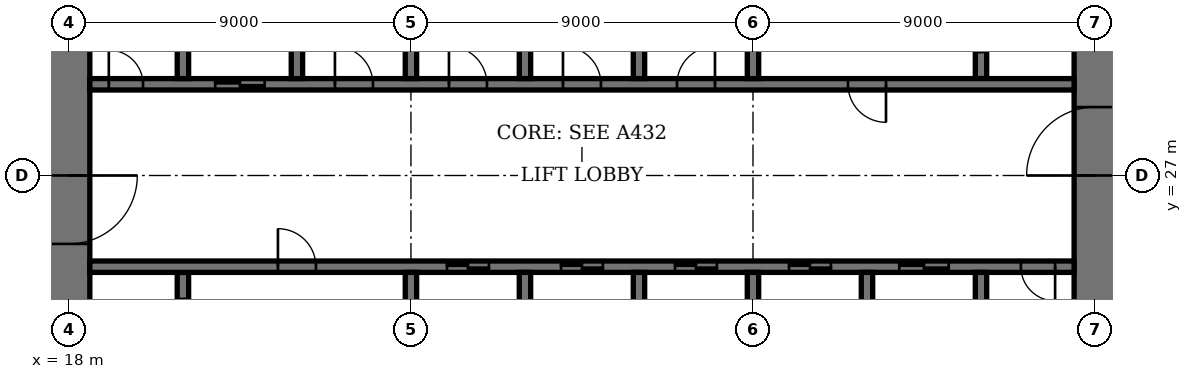
"""IFC4 building model, lengths in metres.
Left out: names, types, materials, properties, quantities, classifications, styles, units other than length and angle.
Written with IfcOpenShell. Run it as: python <this file> out.ifc"""

import sys

from ifc_helpers import new_model, si_unit, direction, frame, frame_2d, origin, place, context, subcontext, project, spatial, rectangle, extrude, element, fill, save


model = new_model("IFC4")
c1 = context("Model", 3, precision=1e-05, world=origin(), true_north=direction((0.0, 1.0)))
c2 = subcontext(c1, "Body", "Model", "MODEL_VIEW")
j1 = project(units=[si_unit("LENGTHUNIT", "METRE"), si_unit("PLANEANGLEUNIT", "RADIAN")], contexts=[c1])
p1 = place(None, origin())
s1 = spatial("IfcSite", under=j1, at=p1, CompositionType="ELEMENT")
p2 = place(p1, origin())
s2 = spatial("IfcBuilding", under=s1, at=p2, CompositionType="ELEMENT")
p3 = place(p2, frame((0.0, 0.0, 259.4)))
s3 = spatial("IfcBuildingStorey", under=s2, at=p3, CompositionType="ELEMENT", Elevation=259.4)
p4 = place(p3, frame((18.0, 35.45, 0.0), z_axis=(0.0, 0.0, 1.0), x_axis=(0.0, -1.0, 0.0)))
e1 = element("IfcWall", 1, at=p4, inside=s3, PredefinedType="SHEAR", context=c2, shape_type="SweptSolid", body=[
    extrude(rectangle(XDim=16.9, YDim=1.1, at=frame_2d((8.45, 0.0))), origin(), (0.0, 0.0, 1.0), 4.0),
])
p5 = place(p4, frame((8.45, 0.0, 0.0)))
e2 = element("IfcOpeningElement", 2, at=p5, cuts=e1, PredefinedType="OPENING", context=c2, shape_type="SweptSolid", body=[
    extrude(rectangle(XDim=1.8, YDim=2.4, at=frame_2d((0.9, 1.2))), frame((0.0, 0.56, 0.0), z_axis=(0.0, -1.0, 0.0), x_axis=(1.0, 0.0, 0.0)), (0.0, 0.0, 1.0), 1.12),
])
p6 = place(p3, frame((45.0, 18.55, 0.0), z_axis=(0.0, 0.0, 1.0), x_axis=(0.0, 1.0, 0.0)))
e3 = element("IfcWall", 3, at=p6, inside=s3, PredefinedType="SHEAR", context=c2, shape_type="SweptSolid", body=[
    extrude(rectangle(XDim=16.9, YDim=1.1, at=frame_2d((8.45, 0.0))), origin(), (0.0, 0.0, 1.0), 4.0),
])
p7 = place(p6, frame((8.45, 0.0, 0.0)))
e4 = element("IfcOpeningElement", 4, at=p7, cuts=e3, PredefinedType="OPENING", context=c2, shape_type="SweptSolid", body=[
    extrude(rectangle(XDim=1.8, YDim=2.4, at=frame_2d((0.9, 1.2))), frame((0.0, 0.56, 0.0), z_axis=(0.0, -1.0, 0.0), x_axis=(1.0, 0.0, 0.0)), (0.0, 0.0, 1.0), 1.12),
])
p8 = place(p3, frame((21.0, 21.95, 0.0), z_axis=(0.0, 0.0, 1.0), x_axis=(0.0, 1.0, 0.0)))
e5 = element("IfcWall", 5, at=p8, inside=s3, PredefinedType="SHEAR", context=c2, shape_type="SweptSolid", body=[
    extrude(rectangle(XDim=2.5, YDim=0.3, at=frame_2d((1.25, 0.0))), origin(), (0.0, 0.0, 1.0), 4.0),
])
p9 = place(p8, frame((0.7, 0.0, 0.0)))
e6 = element("IfcOpeningElement", 6, at=p9, cuts=e5, PredefinedType="OPENING", context=c2, shape_type="SweptSolid", body=[
    extrude(rectangle(XDim=1.1, YDim=2.4, at=frame_2d((0.55, 1.2))), frame((0.0, 0.16, 0.0), z_axis=(0.0, -1.0, 0.0), x_axis=(1.0, 0.0, 0.0)), (0.0, 0.0, 1.0), 0.32),
])
p10 = place(p3, frame((42.0, 29.55, 0.0), z_axis=(0.0, 0.0, 1.0), x_axis=(0.0, 1.0, 0.0)))
e7 = element("IfcWall", 7, at=p10, inside=s3, PredefinedType="SHEAR", context=c2, shape_type="SweptSolid", body=[
    extrude(rectangle(XDim=2.5, YDim=0.3, at=frame_2d((1.25, 0.0))), origin(), (0.0, 0.0, 1.0), 4.0),
])
p11 = place(p10, frame((0.7, 0.0, 0.0)))
e8 = element("IfcOpeningElement", 8, at=p11, cuts=e7, PredefinedType="OPENING", context=c2, shape_type="SweptSolid", body=[
    extrude(rectangle(XDim=1.1, YDim=2.4, at=frame_2d((0.55, 1.2))), frame((0.0, 0.16, 0.0), z_axis=(0.0, -1.0, 0.0), x_axis=(1.0, 0.0, 0.0)), (0.0, 0.0, 1.0), 0.32),
])
p12 = place(p3, frame((18.55, 24.6, 0.0), z_axis=(0.0, 0.0, 1.0), x_axis=(1.0, 0.0, 0.0)))
e9 = element("IfcWall", 9, at=p12, inside=s3, PredefinedType="SHEAR", context=c2, shape_type="SweptSolid", body=[
    extrude(rectangle(XDim=25.9, YDim=0.3, at=frame_2d((12.95, 0.0))), origin(), (0.0, 0.0, 1.0), 4.0),
])
p13 = place(p12, frame((4.95, 0.0, 0.0)))
e10 = element("IfcOpeningElement", 10, at=p13, cuts=e9, PredefinedType="OPENING", context=c2, shape_type="SweptSolid", body=[
    extrude(rectangle(XDim=1.0, YDim=2.4, at=frame_2d((0.5, 1.2))), frame((0.0, 0.16, 0.0), z_axis=(0.0, -1.0, 0.0), x_axis=(1.0, 0.0, 0.0)), (0.0, 0.0, 1.0), 0.32),
])
p14 = place(p12, frame((24.5, 0.0, 0.0)))
e11 = element("IfcOpeningElement", 11, at=p14, cuts=e9, PredefinedType="OPENING", context=c2, shape_type="SweptSolid", body=[
    extrude(rectangle(XDim=0.9, YDim=2.1, at=frame_2d((0.45, 1.05))), frame((0.0, 0.16, 0.0), z_axis=(0.0, -1.0, 0.0), x_axis=(1.0, 0.0, 0.0)), (0.0, 0.0, 1.0), 0.32),
])
p15 = place(p12, frame((9.4, 0.0, 0.0)))
e12 = element("IfcOpeningElement", 12, at=p15, cuts=e9, PredefinedType="OPENING", context=c2, shape_type="SweptSolid", body=[
    extrude(rectangle(XDim=1.1, YDim=2.4, at=frame_2d((0.55, 1.2))), frame((0.0, 0.16, 0.0), z_axis=(0.0, -1.0, 0.0), x_axis=(1.0, 0.0, 0.0)), (0.0, 0.0, 1.0), 0.32),
])
p16 = place(p12, frame((12.4, 0.0, 0.0)))
e13 = element("IfcOpeningElement", 13, at=p16, cuts=e9, PredefinedType="OPENING", context=c2, shape_type="SweptSolid", body=[
    extrude(rectangle(XDim=1.1, YDim=2.4, at=frame_2d((0.55, 1.2))), frame((0.0, 0.16, 0.0), z_axis=(0.0, -1.0, 0.0), x_axis=(1.0, 0.0, 0.0)), (0.0, 0.0, 1.0), 0.32),
])
p17 = place(p12, frame((15.4, 0.0, 0.0)))
e14 = element("IfcOpeningElement", 14, at=p17, cuts=e9, PredefinedType="OPENING", context=c2, shape_type="SweptSolid", body=[
    extrude(rectangle(XDim=1.1, YDim=2.4, at=frame_2d((0.55, 1.2))), frame((0.0, 0.16, 0.0), z_axis=(0.0, -1.0, 0.0), x_axis=(1.0, 0.0, 0.0)), (0.0, 0.0, 1.0), 0.32),
])
p18 = place(p12, frame((18.4, 0.0, 0.0)))
e15 = element("IfcOpeningElement", 15, at=p18, cuts=e9, PredefinedType="OPENING", context=c2, shape_type="SweptSolid", body=[
    extrude(rectangle(XDim=1.1, YDim=2.4, at=frame_2d((0.55, 1.2))), frame((0.0, 0.16, 0.0), z_axis=(0.0, -1.0, 0.0), x_axis=(1.0, 0.0, 0.0)), (0.0, 0.0, 1.0), 0.32),
])
p19 = place(p12, frame((21.3, 0.0, 0.0)))
e16 = element("IfcOpeningElement", 16, at=p19, cuts=e9, PredefinedType="OPENING", context=c2, shape_type="SweptSolid", body=[
    extrude(rectangle(XDim=1.3, YDim=2.4, at=frame_2d((0.65, 1.2))), frame((0.0, 0.16, 0.0), z_axis=(0.0, -1.0, 0.0), x_axis=(1.0, 0.0, 0.0)), (0.0, 0.0, 1.0), 0.32),
])
p20 = place(p3, frame((18.55, 29.4, 0.0), z_axis=(0.0, 0.0, 1.0), x_axis=(1.0, 0.0, 0.0)))
e17 = element("IfcWall", 17, at=p20, inside=s3, PredefinedType="SHEAR", context=c2, shape_type="SweptSolid", body=[
    extrude(rectangle(XDim=25.9, YDim=0.3, at=frame_2d((12.95, 0.0))), origin(), (0.0, 0.0, 1.0), 4.0),
])
p21 = place(p20, frame((19.95, 0.0, 0.0)))
e18 = element("IfcOpeningElement", 18, at=p21, cuts=e17, PredefinedType="OPENING", context=c2, shape_type="SweptSolid", body=[
    extrude(rectangle(XDim=1.0, YDim=2.4, at=frame_2d((0.5, 1.2))), frame((0.0, 0.16, 0.0), z_axis=(0.0, -1.0, 0.0), x_axis=(1.0, 0.0, 0.0)), (0.0, 0.0, 1.0), 0.32),
])
p22 = place(p20, frame((0.5, 0.0, 0.0)))
e19 = element("IfcOpeningElement", 19, at=p22, cuts=e17, PredefinedType="OPENING", context=c2, shape_type="SweptSolid", body=[
    extrude(rectangle(XDim=0.9, YDim=2.1, at=frame_2d((0.45, 1.05))), frame((0.0, 0.16, 0.0), z_axis=(0.0, -1.0, 0.0), x_axis=(1.0, 0.0, 0.0)), (0.0, 0.0, 1.0), 0.32),
])
p23 = place(p20, frame((15.45, 0.0, 0.0)))
e20 = element("IfcOpeningElement", 20, at=p23, cuts=e17, PredefinedType="OPENING", context=c2, shape_type="SweptSolid", body=[
    extrude(rectangle(XDim=1.0, YDim=2.4, at=frame_2d((0.5, 1.2))), frame((0.0, 0.16, 0.0), z_axis=(0.0, -1.0, 0.0), x_axis=(1.0, 0.0, 0.0)), (0.0, 0.0, 1.0), 0.32),
])
p24 = place(p20, frame((12.45, 0.0, 0.0)))
e21 = element("IfcOpeningElement", 21, at=p24, cuts=e17, PredefinedType="OPENING", context=c2, shape_type="SweptSolid", body=[
    extrude(rectangle(XDim=1.0, YDim=2.4, at=frame_2d((0.5, 1.2))), frame((0.0, 0.16, 0.0), z_axis=(0.0, -1.0, 0.0), x_axis=(1.0, 0.0, 0.0)), (0.0, 0.0, 1.0), 0.32),
])
p25 = place(p20, frame((9.45, 0.0, 0.0)))
e22 = element("IfcOpeningElement", 22, at=p25, cuts=e17, PredefinedType="OPENING", context=c2, shape_type="SweptSolid", body=[
    extrude(rectangle(XDim=1.0, YDim=2.4, at=frame_2d((0.5, 1.2))), frame((0.0, 0.16, 0.0), z_axis=(0.0, -1.0, 0.0), x_axis=(1.0, 0.0, 0.0)), (0.0, 0.0, 1.0), 0.32),
])
p26 = place(p20, frame((6.45, 0.0, 0.0)))
e23 = element("IfcOpeningElement", 23, at=p26, cuts=e17, PredefinedType="OPENING", context=c2, shape_type="SweptSolid", body=[
    extrude(rectangle(XDim=1.0, YDim=2.4, at=frame_2d((0.5, 1.2))), frame((0.0, 0.16, 0.0), z_axis=(0.0, -1.0, 0.0), x_axis=(1.0, 0.0, 0.0)), (0.0, 0.0, 1.0), 0.32),
])
p27 = place(p20, frame((3.3, 0.0, 0.0)))
e24 = element("IfcOpeningElement", 24, at=p27, cuts=e17, PredefinedType="OPENING", context=c2, shape_type="SweptSolid", body=[
    extrude(rectangle(XDim=1.3, YDim=2.4, at=frame_2d((0.65, 1.2))), frame((0.0, 0.16, 0.0), z_axis=(0.0, -1.0, 0.0), x_axis=(1.0, 0.0, 0.0)), (0.0, 0.0, 1.0), 0.32),
])
for number, where, z_axis, x_axis in (
    (25, (30.0, 21.75, 0.0), (0.0, 0.0, 1.0), (0.0, 1.0, 0.0)),
    (26, (33.0, 29.55, 0.0), (0.0, 0.0, 1.0), (0.0, 1.0, 0.0)),
    (27, (33.0, 21.75, 0.0), (0.0, 0.0, 1.0), (0.0, 1.0, 0.0)),
    (28, (30.0, 29.55, 0.0), (0.0, 0.0, 1.0), (0.0, 1.0, 0.0)),
    (29, (36.0, 21.75, 0.0), (0.0, 0.0, 1.0), (0.0, 1.0, 0.0)),
    (30, (27.0, 29.55, 0.0), (0.0, 0.0, 1.0), (0.0, 1.0, 0.0)),
):
    element("IfcWall", number, at=place(p3, frame(where, z_axis=z_axis, x_axis=x_axis)), inside=s3, PredefinedType="SHEAR", context=c2, shape_type="SweptSolid", body=[
        extrude(rectangle(XDim=2.7, YDim=0.3, at=frame_2d((1.35, 0.0))), origin(), (0.0, 0.0, 1.0), 4.0),
    ])
for number, where, z_axis, x_axis in (
    (31, (39.0, 18.55, 0.0), (0.0, 0.0, 1.0), (0.0, 1.0, 0.0)),
    (32, (24.0, 29.55, 0.0), (0.0, 0.0, 1.0), (0.0, 1.0, 0.0)),
):
    element("IfcWall", number, at=place(p3, frame(where, z_axis=z_axis, x_axis=x_axis)), inside=s3, PredefinedType="SHEAR", context=c2, shape_type="SweptSolid", body=[
        extrude(rectangle(XDim=5.9, YDim=0.3, at=frame_2d((2.95, 0.0))), origin(), (0.0, 0.0, 1.0), 4.0),
    ])
for number, where, z_axis, x_axis in (
    (33, (42.0, 21.75, 0.0), (0.0, 0.0, 1.0), (0.0, 1.0, 0.0)),
    (34, (21.0, 29.55, 0.0), (0.0, 0.0, 1.0), (0.0, 1.0, 0.0)),
):
    element("IfcWall", number, at=place(p3, frame(where, z_axis=z_axis, x_axis=x_axis)), inside=s3, PredefinedType="SHEAR", context=c2, shape_type="SweptSolid", body=[
        extrude(rectangle(XDim=2.7, YDim=0.3, at=frame_2d((1.35, 0.0))), origin(), (0.0, 0.0, 1.0), 4.0),
    ])
for number, where, z_axis, x_axis in (
    (35, (27.0, 21.6, 0.0), (0.0, 0.0, 1.0), (0.0, 1.0, 0.0)),
    (36, (36.0, 29.55, 0.0), (0.0, 0.0, 1.0), (0.0, 1.0, 0.0)),
):
    element("IfcWall", number, at=place(p3, frame(where, z_axis=z_axis, x_axis=x_axis)), inside=s3, PredefinedType="SHEAR", context=c2, shape_type="SweptSolid", body=[
        extrude(rectangle(XDim=2.85, YDim=0.3, at=frame_2d((1.425, 0.0))), origin(), (0.0, 0.0, 1.0), 4.0),
    ])
p28 = place(p5, origin())
e37 = element("IfcDoor", 37, at=p28, inside=s3, OperationType="DOUBLE_DOOR_DOUBLE_SWING", PredefinedType="DOOR", context=c2, shape_type="SweptSolid", body=[
    extrude(rectangle(XDim=1.8, YDim=2.4, at=frame_2d((0.9, 1.2))), frame((0.0, 0.03, 0.0), z_axis=(0.0, -1.0, 0.0), x_axis=(1.0, 0.0, 0.0)), (0.0, 0.0, 1.0), 0.06),
    extrude(rectangle(XDim=0.04, YDim=2.4, at=frame_2d((0.02, 1.2))), frame((0.0, 0.55, 0.0), z_axis=(0.0, -1.0, 0.0), x_axis=(1.0, 0.0, 0.0)), (0.0, 0.0, 1.0), 1.1),
    extrude(rectangle(XDim=0.04, YDim=2.4, at=frame_2d((1.78, 1.2))), frame((0.0, 0.55, 0.0), z_axis=(0.0, -1.0, 0.0), x_axis=(1.0, 0.0, 0.0)), (0.0, 0.0, 1.0), 1.1),
    extrude(rectangle(XDim=1.8, YDim=0.04, at=frame_2d((0.9, 2.38))), frame((0.0, 0.55, 0.0), z_axis=(0.0, -1.0, 0.0), x_axis=(1.0, 0.0, 0.0)), (0.0, 0.0, 1.0), 1.1),
])
fill(e2, e37)
p29 = place(p7, origin())
e38 = element("IfcDoor", 38, at=p29, inside=s3, OperationType="DOUBLE_DOOR_DOUBLE_SWING", PredefinedType="DOOR", context=c2, shape_type="SweptSolid", body=[
    extrude(rectangle(XDim=1.8, YDim=2.4, at=frame_2d((0.9, 1.2))), frame((0.0, 0.03, 0.0), z_axis=(0.0, -1.0, 0.0), x_axis=(1.0, 0.0, 0.0)), (0.0, 0.0, 1.0), 0.06),
    extrude(rectangle(XDim=0.04, YDim=2.4, at=frame_2d((0.02, 1.2))), frame((0.0, 0.55, 0.0), z_axis=(0.0, -1.0, 0.0), x_axis=(1.0, 0.0, 0.0)), (0.0, 0.0, 1.0), 1.1),
    extrude(rectangle(XDim=0.04, YDim=2.4, at=frame_2d((1.78, 1.2))), frame((0.0, 0.55, 0.0), z_axis=(0.0, -1.0, 0.0), x_axis=(1.0, 0.0, 0.0)), (0.0, 0.0, 1.0), 1.1),
    extrude(rectangle(XDim=1.8, YDim=0.04, at=frame_2d((0.9, 2.38))), frame((0.0, 0.55, 0.0), z_axis=(0.0, -1.0, 0.0), x_axis=(1.0, 0.0, 0.0)), (0.0, 0.0, 1.0), 1.1),
])
fill(e4, e38)
p30 = place(p13, origin())
e39 = element("IfcDoor", 39, at=p30, inside=s3, OperationType="SINGLE_SWING_RIGHT", PredefinedType="DOOR", context=c2, shape_type="SweptSolid", body=[
    extrude(rectangle(XDim=1.0, YDim=2.4, at=frame_2d((0.5, 1.2))), frame((0.0, 0.03, 0.0), z_axis=(0.0, -1.0, 0.0), x_axis=(1.0, 0.0, 0.0)), (0.0, 0.0, 1.0), 0.06),
])
fill(e10, e39)
p31 = place(p21, origin())
e40 = element("IfcDoor", 40, at=p31, inside=s3, OperationType="SINGLE_SWING_RIGHT", PredefinedType="DOOR", context=c2, shape_type="SweptSolid", body=[
    extrude(rectangle(XDim=1.0, YDim=2.4, at=frame_2d((0.5, 1.2))), frame((0.0, 0.03, 0.0), z_axis=(0.0, -1.0, 0.0), x_axis=(1.0, 0.0, 0.0)), (0.0, 0.0, 1.0), 0.06),
])
fill(e18, e40)
p32 = place(p14, origin())
e41 = element("IfcDoor", 41, at=p32, inside=s3, OperationType="SINGLE_SWING_RIGHT", PredefinedType="DOOR", context=c2, shape_type="SweptSolid", body=[
    extrude(rectangle(XDim=0.9, YDim=2.1, at=frame_2d((0.45, 1.05))), frame((0.0, 0.03, 0.0), z_axis=(0.0, -1.0, 0.0), x_axis=(1.0, 0.0, 0.0)), (0.0, 0.0, 1.0), 0.06),
])
fill(e11, e41)
p33 = place(p22, origin())
e42 = element("IfcDoor", 42, at=p33, inside=s3, OperationType="SINGLE_SWING_RIGHT", PredefinedType="DOOR", context=c2, shape_type="SweptSolid", body=[
    extrude(rectangle(XDim=0.9, YDim=2.1, at=frame_2d((0.45, 1.05))), frame((0.0, 0.03, 0.0), z_axis=(0.0, -1.0, 0.0), x_axis=(1.0, 0.0, 0.0)), (0.0, 0.0, 1.0), 0.06),
])
fill(e19, e42)
p34 = place(p15, origin())
e43 = element("IfcDoor", 43, at=p34, inside=s3, OperationType="DOUBLE_DOOR_SLIDING", PredefinedType="DOOR", context=c2, shape_type="SweptSolid", body=[
    extrude(rectangle(XDim=1.1, YDim=2.4, at=frame_2d((0.55, 1.2))), frame((0.0, 0.02, 0.0), z_axis=(0.0, -1.0, 0.0), x_axis=(1.0, 0.0, 0.0)), (0.0, 0.0, 1.0), 0.04),
])
fill(e12, e43)
p35 = place(p16, origin())
e44 = element("IfcDoor", 44, at=p35, inside=s3, OperationType="DOUBLE_DOOR_SLIDING", PredefinedType="DOOR", context=c2, shape_type="SweptSolid", body=[
    extrude(rectangle(XDim=1.1, YDim=2.4, at=frame_2d((0.55, 1.2))), frame((0.0, 0.02, 0.0), z_axis=(0.0, -1.0, 0.0), x_axis=(1.0, 0.0, 0.0)), (0.0, 0.0, 1.0), 0.04),
])
fill(e13, e44)
p36 = place(p17, origin())
e45 = element("IfcDoor", 45, at=p36, inside=s3, OperationType="DOUBLE_DOOR_SLIDING", PredefinedType="DOOR", context=c2, shape_type="SweptSolid", body=[
    extrude(rectangle(XDim=1.1, YDim=2.4, at=frame_2d((0.55, 1.2))), frame((0.0, 0.02, 0.0), z_axis=(0.0, -1.0, 0.0), x_axis=(1.0, 0.0, 0.0)), (0.0, 0.0, 1.0), 0.04),
])
fill(e14, e45)
p37 = place(p18, origin())
e46 = element("IfcDoor", 46, at=p37, inside=s3, OperationType="DOUBLE_DOOR_SLIDING", PredefinedType="DOOR", context=c2, shape_type="SweptSolid", body=[
    extrude(rectangle(XDim=1.1, YDim=2.4, at=frame_2d((0.55, 1.2))), frame((0.0, 0.02, 0.0), z_axis=(0.0, -1.0, 0.0), x_axis=(1.0, 0.0, 0.0)), (0.0, 0.0, 1.0), 0.04),
])
fill(e15, e46)
p38 = place(p23, origin())
e47 = element("IfcDoor", 47, at=p38, inside=s3, OperationType="SINGLE_SWING_LEFT", PredefinedType="DOOR", context=c2, shape_type="SweptSolid", body=[
    extrude(rectangle(XDim=1.0, YDim=2.4, at=frame_2d((0.5, 1.2))), frame((0.0, 0.03, 0.0), z_axis=(0.0, -1.0, 0.0), x_axis=(1.0, 0.0, 0.0)), (0.0, 0.0, 1.0), 0.06),
])
fill(e20, e47)
p39 = place(p24, origin())
e48 = element("IfcDoor", 48, at=p39, inside=s3, OperationType="SINGLE_SWING_RIGHT", PredefinedType="DOOR", context=c2, shape_type="SweptSolid", body=[
    extrude(rectangle(XDim=1.0, YDim=2.4, at=frame_2d((0.5, 1.2))), frame((0.0, 0.03, 0.0), z_axis=(0.0, -1.0, 0.0), x_axis=(1.0, 0.0, 0.0)), (0.0, 0.0, 1.0), 0.06),
])
fill(e21, e48)
p40 = place(p25, origin())
e49 = element("IfcDoor", 49, at=p40, inside=s3, OperationType="SINGLE_SWING_RIGHT", PredefinedType="DOOR", context=c2, shape_type="SweptSolid", body=[
    extrude(rectangle(XDim=1.0, YDim=2.4, at=frame_2d((0.5, 1.2))), frame((0.0, 0.03, 0.0), z_axis=(0.0, -1.0, 0.0), x_axis=(1.0, 0.0, 0.0)), (0.0, 0.0, 1.0), 0.06),
])
fill(e22, e49)
p41 = place(p26, origin())
e50 = element("IfcDoor", 50, at=p41, inside=s3, OperationType="SINGLE_SWING_RIGHT", PredefinedType="DOOR", context=c2, shape_type="SweptSolid", body=[
    extrude(rectangle(XDim=1.0, YDim=2.4, at=frame_2d((0.5, 1.2))), frame((0.0, 0.03, 0.0), z_axis=(0.0, -1.0, 0.0), x_axis=(1.0, 0.0, 0.0)), (0.0, 0.0, 1.0), 0.06),
])
fill(e23, e50)
p42 = place(p19, origin())
e51 = element("IfcDoor", 51, at=p42, inside=s3, OperationType="DOUBLE_DOOR_SLIDING", PredefinedType="DOOR", context=c2, shape_type="SweptSolid", body=[
    extrude(rectangle(XDim=1.3, YDim=2.4, at=frame_2d((0.65, 1.2))), frame((0.0, 0.02, 0.0), z_axis=(0.0, -1.0, 0.0), x_axis=(1.0, 0.0, 0.0)), (0.0, 0.0, 1.0), 0.04),
])
fill(e16, e51)
p43 = place(p27, origin())
e52 = element("IfcDoor", 52, at=p43, inside=s3, OperationType="DOUBLE_DOOR_SLIDING", PredefinedType="DOOR", context=c2, shape_type="SweptSolid", body=[
    extrude(rectangle(XDim=1.3, YDim=2.4, at=frame_2d((0.65, 1.2))), frame((0.0, 0.02, 0.0), z_axis=(0.0, -1.0, 0.0), x_axis=(1.0, 0.0, 0.0)), (0.0, 0.0, 1.0), 0.04),
])
fill(e24, e52)
save(model, sys.argv[1])
